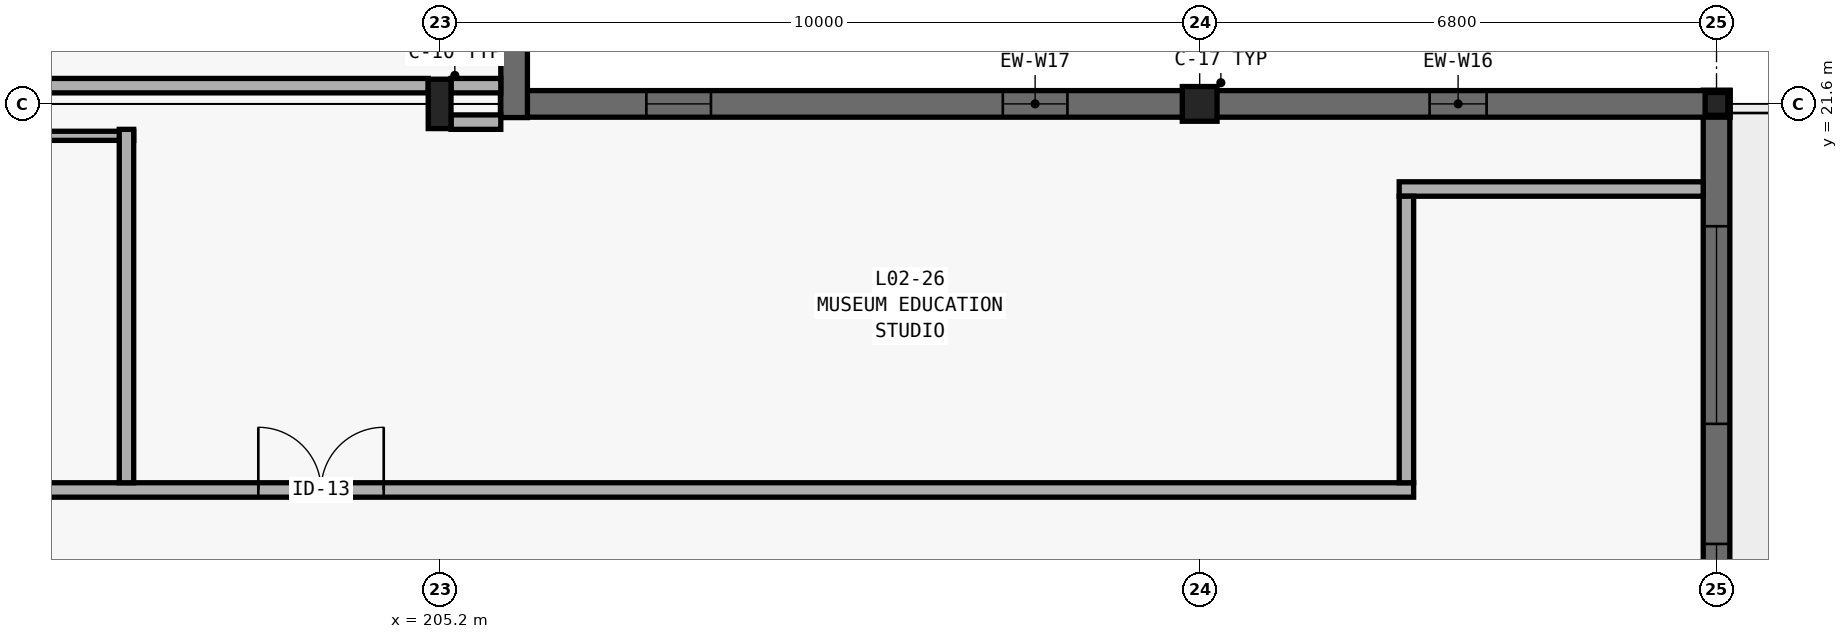
"""IFC4 building model, lengths in metres.
Left out: names, types, materials, properties, quantities, classifications, styles, units other than length and angle.
Written with IfcOpenShell. Run it as: python <this file> out.ifc"""

import sys

from ifc_helpers import new_model, si_unit, direction, frame, frame_2d, origin, origin_2d, place, context, subcontext, project, spatial, rectangle, hollow_rectangle, hollow_circle, i_section, extrude, element, fill, save


model = new_model("IFC4")
c1 = context("Model", 3, precision=1e-05, world=origin(), true_north=direction((0.0, 1.0)))
c2 = subcontext(c1, "Body", "Model", "MODEL_VIEW")
j1 = project(units=[si_unit("LENGTHUNIT", "METRE"), si_unit("PLANEANGLEUNIT", "RADIAN")], contexts=[c1])
p1 = place(None, origin())
s1 = spatial("IfcSite", under=j1, at=p1, CompositionType="ELEMENT")
p2 = place(p1, origin())
s2 = spatial("IfcBuilding", under=s1, at=p2, CompositionType="ELEMENT")
p3 = place(p2, frame((0.0, 0.0, 9.0)))
s3 = spatial("IfcBuildingStorey", under=s2, at=p3, CompositionType="ELEMENT", Elevation=9.0)
p4 = place(p3, frame((205.2, 21.6, 0.0), z_axis=(0.0, 0.0, 1.0), x_axis=(1.0, 0.0, 0.0)))
e1 = element("IfcColumn", 1, at=p4, inside=s3, PredefinedType="COLUMN", context=c2, shape_type="SweptSolid", body=[
    extrude(i_section(OverallWidth=0.3, OverallDepth=0.65, WebThickness=0.016, FlangeThickness=0.031, FilletRadius=0.027, at=origin_2d()), origin(), (0.0, 0.0, 1.0), 8.1),
])
p5 = place(p3, frame((215.2, 21.6, 0.0), z_axis=(0.0, 0.0, 1.0), x_axis=(1.0, 0.0, 0.0)))
e2 = element("IfcColumn", 2, at=p5, inside=s3, PredefinedType="COLUMN", context=c2, shape_type="SweptSolid", body=[
    extrude(hollow_circle(Radius=0.229, WallThickness=0.02, at=origin_2d()), origin(), (0.0, 0.0, 1.0), 8.1),
])
p6 = place(p3, frame((222.0, 21.6, 0.0), z_axis=(0.0, 0.0, 1.0), x_axis=(1.0, 0.0, 0.0)))
e3 = element("IfcColumn", 3, at=p6, inside=s3, PredefinedType="COLUMN", context=c2, shape_type="SweptSolid", body=[
    extrude(hollow_rectangle(XDim=0.3, YDim=0.3, WallThickness=0.016, at=origin_2d()), origin(), (0.0, 0.0, 1.0), 8.1),
])
p7 = place(p3, frame((222.0, 9.42, 0.0), z_axis=(0.0, 0.0, 1.0), x_axis=(0.0, 1.0, 0.0)))
e4 = element("IfcWall", 4, at=p7, inside=s3, PredefinedType="STANDARD", context=c2, shape_type="SweptSolid", body=[
    extrude(rectangle(XDim=12.36, YDim=0.35, at=frame_2d((6.18, 0.0))), origin(), (0.0, 0.0, 1.0), 7.8),
])
p8 = place(p7, frame((3.79, 0.0, 0.9)))
e5 = element("IfcOpeningElement", 5, at=p8, cuts=e4, PredefinedType="OPENING", context=c2, shape_type="SweptSolid", body=[
    extrude(rectangle(XDim=2.6, YDim=1.2, at=frame_2d((1.3, 0.6))), frame((0.0, 0.19, 0.0), z_axis=(0.0, -1.0, 0.0), x_axis=(1.0, 0.0, 0.0)), (0.0, 0.0, 1.0), 0.38),
])
p9 = place(p7, frame((7.97, 0.0, 0.9)))
e6 = element("IfcOpeningElement", 6, at=p9, cuts=e4, PredefinedType="OPENING", context=c2, shape_type="SweptSolid", body=[
    extrude(rectangle(XDim=2.6, YDim=1.2, at=frame_2d((1.3, 0.6))), frame((0.0, 0.19, 0.0), z_axis=(0.0, -1.0, 0.0), x_axis=(1.0, 0.0, 0.0)), (0.0, 0.0, 1.0), 0.38),
])
p10 = place(p3, frame((222.18, 21.6, 0.0), z_axis=(0.0, 0.0, 1.0), x_axis=(-1.0, 0.0, 0.0)))
e7 = element("IfcWall", 7, at=p10, inside=s3, PredefinedType="STANDARD", context=c2, shape_type="SweptSolid", body=[
    extrude(rectangle(XDim=7.16, YDim=0.35, at=frame_2d((3.58, 0.0))), origin(), (0.0, 0.0, 1.0), 7.8),
])
p11 = place(p10, frame((3.205, 0.0, 0.9)))
e8 = element("IfcOpeningElement", 8, at=p11, cuts=e7, PredefinedType="OPENING", context=c2, shape_type="SweptSolid", body=[
    extrude(rectangle(XDim=0.75, YDim=2.2, at=frame_2d((0.375, 1.1))), frame((0.0, 0.19, 0.0), z_axis=(0.0, -1.0, 0.0), x_axis=(1.0, 0.0, 0.0)), (0.0, 0.0, 1.0), 0.38),
])
p12 = place(p3, frame((215.38, 21.6, 0.0), z_axis=(0.0, 0.0, 1.0), x_axis=(-1.0, 0.0, 0.0)))
e9 = element("IfcWall", 9, at=p12, inside=s3, PredefinedType="STANDARD", context=c2, shape_type="SweptSolid", body=[
    extrude(rectangle(XDim=9.38, YDim=0.35, at=frame_2d((4.69, 0.0))), origin(), (0.0, 0.0, 1.0), 7.8),
])
p13 = place(p12, frame((1.92, 0.0, 0.9)))
e10 = element("IfcOpeningElement", 10, at=p13, cuts=e9, PredefinedType="OPENING", context=c2, shape_type="SweptSolid", body=[
    extrude(rectangle(XDim=0.85, YDim=2.5, at=frame_2d((0.425, 1.25))), frame((0.0, 0.19, 0.0), z_axis=(0.0, -1.0, 0.0), x_axis=(1.0, 0.0, 0.0)), (0.0, 0.0, 1.0), 0.38),
])
p14 = place(p12, frame((6.61, 0.0, 0.9)))
e11 = element("IfcOpeningElement", 11, at=p14, cuts=e9, PredefinedType="OPENING", context=c2, shape_type="SweptSolid", body=[
    extrude(rectangle(XDim=0.85, YDim=2.5, at=frame_2d((0.425, 1.25))), frame((0.0, 0.19, 0.0), z_axis=(0.0, -1.0, 0.0), x_axis=(1.0, 0.0, 0.0)), (0.0, 0.0, 1.0), 0.38),
])
p15 = place(p3, frame((206.18, 21.42, 0.0), z_axis=(0.0, 0.0, 1.0), x_axis=(0.0, 1.0, 0.0)))
e12 = element("IfcWall", 12, at=p15, inside=s3, PredefinedType="STANDARD", context=c2, shape_type="SweptSolid", body=[
    extrude(rectangle(XDim=8.76, YDim=0.35, at=frame_2d((4.38, 0.0))), origin(), (0.0, 0.0, 1.0), 7.8),
])
p16 = place(p3, frame((180.185, 16.52, 0.0), z_axis=(0.0, 0.0, 1.0), x_axis=(1.0, 0.0, 0.0)))
e13 = element("IfcWall", 13, at=p16, inside=s3, PredefinedType="PARTITIONING", context=c2, shape_type="SweptSolid", body=[
    extrude(rectangle(XDim=37.83, YDim=0.19, at=frame_2d((18.915, 0.0))), origin(), (0.0, 0.0, 1.0), 6.7),
])
p17 = place(p16, frame((18.39, 0.0, 0.0)))
e14 = element("IfcOpeningElement", 14, at=p17, cuts=e13, PredefinedType="OPENING", context=c2, shape_type="SweptSolid", body=[
    extrude(rectangle(XDim=1.05, YDim=2.1, at=frame_2d((0.525, 1.05))), frame((0.0, 0.11, 0.0), z_axis=(0.0, -1.0, 0.0), x_axis=(1.0, 0.0, 0.0)), (0.0, 0.0, 1.0), 0.22),
])
p18 = place(p16, frame((13.275, 0.0, 0.0)))
e15 = element("IfcOpeningElement", 15, at=p18, cuts=e13, PredefinedType="OPENING", context=c2, shape_type="SweptSolid", body=[
    extrude(rectangle(XDim=2.2, YDim=2.45, at=frame_2d((1.1, 1.225))), frame((0.0, 0.11, 0.0), z_axis=(0.0, -1.0, 0.0), x_axis=(1.0, 0.0, 0.0)), (0.0, 0.0, 1.0), 0.22),
])
p19 = place(p16, frame((22.63, 0.0, 0.0)))
e16 = element("IfcOpeningElement", 16, at=p19, cuts=e13, PredefinedType="OPENING", context=c2, shape_type="SweptSolid", body=[
    extrude(rectangle(XDim=1.65, YDim=2.25, at=frame_2d((0.825, 1.125))), frame((0.0, 0.11, 0.0), z_axis=(0.0, -1.0, 0.0), x_axis=(1.0, 0.0, 0.0)), (0.0, 0.0, 1.0), 0.22),
])
p20 = place(p3, frame((217.825, 20.48, 0.0), z_axis=(0.0, 0.0, 1.0), x_axis=(1.0, 0.0, 0.0)))
e17 = element("IfcWall", 17, at=p20, inside=s3, PredefinedType="PARTITIONING", context=c2, shape_type="SweptSolid", body=[
    extrude(rectangle(XDim=4.0, YDim=0.19, at=frame_2d((2.0, 0.0))), origin(), (0.0, 0.0, 1.0), 6.7),
])
p21 = place(p3, frame((196.225, 21.18, 0.0), z_axis=(0.0, 0.0, 1.0), x_axis=(1.0, 0.0, 0.0)))
e18 = element("IfcWall", 18, at=p21, inside=s3, PredefinedType="PARTITIONING", context=c2, shape_type="SweptSolid", body=[
    extrude(rectangle(XDim=4.95, YDim=0.12, at=frame_2d((2.475, 0.0))), origin(), (0.0, 0.0, 1.0), 6.7),
])
p22 = place(p3, frame((205.35, 21.36, 0.0), z_axis=(0.0, 0.0, 1.0), x_axis=(1.0, 0.0, 0.0)))
e19 = element("IfcWall", 19, at=p22, inside=s3, PredefinedType="PARTITIONING", context=c2, shape_type="SweptSolid", body=[
    extrude(rectangle(XDim=0.655, YDim=0.19, at=frame_2d((0.327, 0.0))), origin(), (0.0, 0.0, 1.0), 6.7),
])
p23 = place(p3, frame((195.35, 21.84, 0.0), z_axis=(0.0, 0.0, 1.0), x_axis=(1.0, 0.0, 0.0)))
e20 = element("IfcWall", 20, at=p23, inside=s3, PredefinedType="PARTITIONING", context=c2, shape_type="SweptSolid", body=[
    extrude(rectangle(XDim=9.7, YDim=0.19, at=frame_2d((4.85, 0.0))), origin(), (0.0, 0.0, 1.0), 6.7),
])
p24 = place(p3, frame((205.35, 21.84, 0.0), z_axis=(0.0, 0.0, 1.0), x_axis=(1.0, 0.0, 0.0)))
e21 = element("IfcWall", 21, at=p24, inside=s3, PredefinedType="PARTITIONING", context=c2, shape_type="SweptSolid", body=[
    extrude(rectangle(XDim=0.655, YDim=0.19, at=frame_2d((0.327, 0.0))), origin(), (0.0, 0.0, 1.0), 6.7),
])
p25 = place(p3, frame((201.08, 16.615, 0.0), z_axis=(0.0, 0.0, 1.0), x_axis=(0.0, 1.0, 0.0)))
e22 = element("IfcWall", 22, at=p25, inside=s3, PredefinedType="PARTITIONING", context=c2, shape_type="SweptSolid", body=[
    extrude(rectangle(XDim=4.65, YDim=0.19, at=frame_2d((2.325, 0.0))), origin(), (0.0, 0.0, 1.0), 6.7),
])
p26 = place(p3, frame((217.92, 16.615, 0.0), z_axis=(0.0, 0.0, 1.0), x_axis=(0.0, 1.0, 0.0)))
e23 = element("IfcWall", 23, at=p26, inside=s3, PredefinedType="PARTITIONING", context=c2, shape_type="SweptSolid", body=[
    extrude(rectangle(XDim=3.77, YDim=0.19, at=frame_2d((1.885, 0.0))), origin(), (0.0, 0.0, 1.0), 6.7),
])
p27 = place(p8, origin())
e24 = element("IfcWindow", 24, at=p27, inside=s3, PartitioningType="SINGLE_PANEL", PredefinedType="WINDOW", context=c2, shape_type="SweptSolid", body=[
    extrude(rectangle(XDim=2.6, YDim=1.2, at=frame_2d((1.3, 0.6))), frame((0.0, 0.03, 0.0), z_axis=(0.0, -1.0, 0.0), x_axis=(1.0, 0.0, 0.0)), (0.0, 0.0, 1.0), 0.06),
])
fill(e5, e24)
p28 = place(p9, origin())
e25 = element("IfcWindow", 25, at=p28, inside=s3, PartitioningType="SINGLE_PANEL", PredefinedType="WINDOW", context=c2, shape_type="SweptSolid", body=[
    extrude(rectangle(XDim=2.6, YDim=1.2, at=frame_2d((1.3, 0.6))), frame((0.0, 0.03, 0.0), z_axis=(0.0, -1.0, 0.0), x_axis=(1.0, 0.0, 0.0)), (0.0, 0.0, 1.0), 0.06),
])
fill(e6, e25)
p29 = place(p11, origin())
e26 = element("IfcWindow", 26, at=p29, inside=s3, PartitioningType="SINGLE_PANEL", PredefinedType="WINDOW", context=c2, shape_type="SweptSolid", body=[
    extrude(rectangle(XDim=0.75, YDim=2.2, at=frame_2d((0.375, 1.1))), frame((0.0, 0.03, 0.0), z_axis=(0.0, -1.0, 0.0), x_axis=(1.0, 0.0, 0.0)), (0.0, 0.0, 1.0), 0.06),
])
fill(e8, e26)
p30 = place(p13, origin())
e27 = element("IfcWindow", 27, at=p30, inside=s3, PartitioningType="SINGLE_PANEL", PredefinedType="WINDOW", context=c2, shape_type="SweptSolid", body=[
    extrude(rectangle(XDim=0.85, YDim=2.5, at=frame_2d((0.425, 1.25))), frame((0.0, 0.03, 0.0), z_axis=(0.0, -1.0, 0.0), x_axis=(1.0, 0.0, 0.0)), (0.0, 0.0, 1.0), 0.06),
])
fill(e10, e27)
p31 = place(p14, origin())
e28 = element("IfcWindow", 28, at=p31, inside=s3, PartitioningType="SINGLE_PANEL", PredefinedType="WINDOW", context=c2, shape_type="SweptSolid", body=[
    extrude(rectangle(XDim=0.85, YDim=2.5, at=frame_2d((0.425, 1.25))), frame((0.0, 0.03, 0.0), z_axis=(0.0, -1.0, 0.0), x_axis=(1.0, 0.0, 0.0)), (0.0, 0.0, 1.0), 0.06),
])
fill(e11, e28)
p32 = place(p19, origin())
e29 = element("IfcDoor", 29, at=p32, inside=s3, OperationType="DOUBLE_DOOR_SINGLE_SWING", PredefinedType="DOOR", context=c2, shape_type="SweptSolid", body=[
    extrude(rectangle(XDim=1.65, YDim=2.25, at=frame_2d((0.825, 1.125))), frame((0.0, 0.025, 0.0), z_axis=(0.0, -1.0, 0.0), x_axis=(1.0, 0.0, 0.0)), (0.0, 0.0, 1.0), 0.05),
])
fill(e16, e29)
save(model, sys.argv[1])
